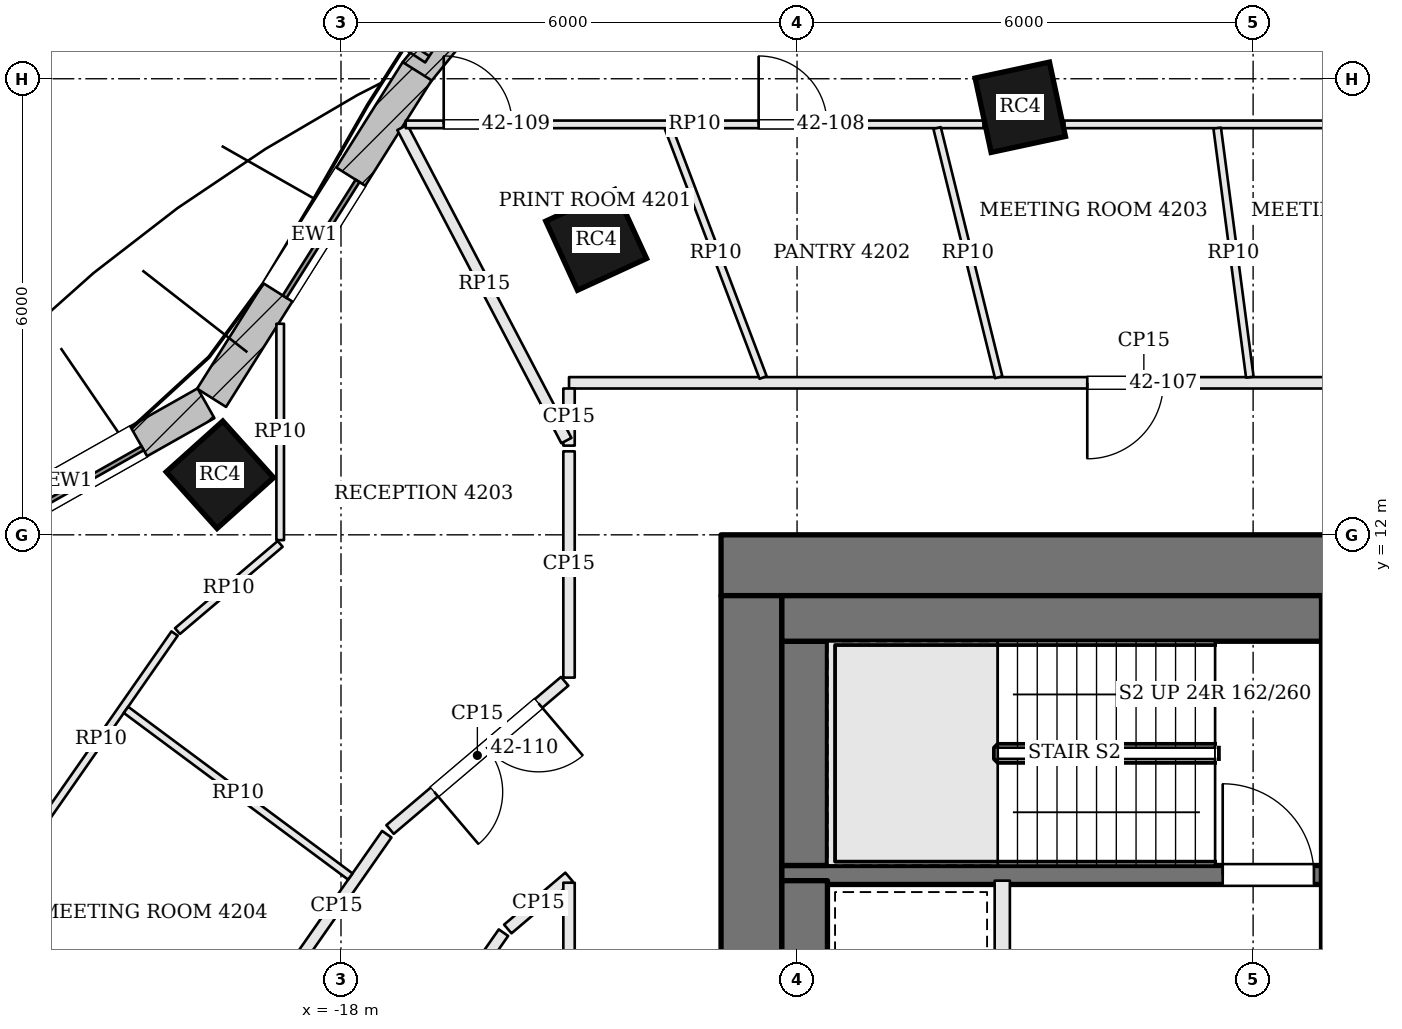
"""IFC4 building model, lengths in metres.
Left out: names, types, materials, properties, quantities, classifications, styles, units other than length and angle.
Written with IfcOpenShell. Run it as: python <this file> out.ifc"""

import sys

from ifc_helpers import new_model, si_unit, direction, frame, frame_2d, origin, origin_2d, place, context, subcontext, project, spatial, rectangle, extrude, element, fill, save


model = new_model("IFC4")
c1 = context("Model", 3, precision=1e-05, world=origin(), true_north=direction((0.0, 1.0)))
c2 = subcontext(c1, "Body", "Model", "MODEL_VIEW")
j1 = project(units=[si_unit("LENGTHUNIT", "METRE"), si_unit("PLANEANGLEUNIT", "RADIAN")], contexts=[c1])
p1 = place(None, origin())
s1 = spatial("IfcSite", under=j1, at=p1, CompositionType="ELEMENT")
p2 = place(p1, origin())
s2 = spatial("IfcBuilding", under=s1, at=p2, CompositionType="ELEMENT")
p3 = place(p2, frame((0.0, 0.0, 174.0)))
s3 = spatial("IfcBuildingStorey", under=s2, at=p3, CompositionType="ELEMENT", Elevation=174.0)
p4 = place(p3, frame((-13.0, 11.6, 0.0), z_axis=(0.0, 0.0, 1.0), x_axis=(1.0, 0.0, 0.0)))
e1 = element("IfcWall", 1, at=p4, inside=s3, PredefinedType="SHEAR", context=c2, shape_type="SweptSolid", body=[
    extrude(rectangle(XDim=26.0, YDim=0.8, at=frame_2d((13.0, 0.0))), origin(), (0.0, 0.0, 1.0), 3.9),
])
p5 = place(p4, frame((9.375, 0.0, 0.0)))
e2 = element("IfcOpeningElement", 2, at=p5, cuts=e1, PredefinedType="OPENING", context=c2, shape_type="SweptSolid", body=[
    extrude(rectangle(XDim=0.7, YDim=2.1, at=frame_2d((0.35, 1.05))), frame((0.0, 0.41, 0.0), z_axis=(0.0, -1.0, 0.0), x_axis=(1.0, 0.0, 0.0)), (0.0, 0.0, 1.0), 0.82),
])
p6 = place(p4, frame((12.075, 0.0, 0.0)))
e3 = element("IfcOpeningElement", 3, at=p6, cuts=e1, PredefinedType="OPENING", context=c2, shape_type="SweptSolid", body=[
    extrude(rectangle(XDim=1.0, YDim=2.1, at=frame_2d((0.5, 1.05))), frame((0.0, 0.41, 0.0), z_axis=(0.0, -1.0, 0.0), x_axis=(1.0, 0.0, 0.0)), (0.0, 0.0, 1.0), 0.82),
])
p7 = place(p4, frame((14.675, 0.0, 0.0)))
e4 = element("IfcOpeningElement", 4, at=p7, cuts=e1, PredefinedType="OPENING", context=c2, shape_type="SweptSolid", body=[
    extrude(rectangle(XDim=0.7, YDim=2.1, at=frame_2d((0.35, 1.05))), frame((0.0, 0.41, 0.0), z_axis=(0.0, -1.0, 0.0), x_axis=(1.0, 0.0, 0.0)), (0.0, 0.0, 1.0), 0.82),
])
p8 = place(p4, frame((16.625, 0.0, 0.0)))
e5 = element("IfcOpeningElement", 5, at=p8, cuts=e1, PredefinedType="OPENING", context=c2, shape_type="SweptSolid", body=[
    extrude(rectangle(XDim=0.9, YDim=2.1, at=frame_2d((0.45, 1.05))), frame((0.0, 0.41, 0.0), z_axis=(0.0, -1.0, 0.0), x_axis=(1.0, 0.0, 0.0)), (0.0, 0.0, 1.0), 0.82),
])
p9 = place(p3, frame((-12.6, -2.2, 0.0), z_axis=(0.0, 0.0, 1.0), x_axis=(0.0, 1.0, 0.0)))
e6 = element("IfcWall", 6, at=p9, inside=s3, PredefinedType="SHEAR", context=c2, shape_type="SweptSolid", body=[
    extrude(rectangle(XDim=13.4, YDim=0.8, at=frame_2d((6.7, 0.0))), origin(), (0.0, 0.0, 1.0), 3.9),
])
p10 = place(p9, frame((4.2, 0.0, 0.0)))
e7 = element("IfcOpeningElement", 7, at=p10, cuts=e6, PredefinedType="OPENING", context=c2, shape_type="SweptSolid", body=[
    extrude(rectangle(XDim=1.8, YDim=2.1, at=frame_2d((0.9, 1.05))), frame((0.0, 0.41, 0.0), z_axis=(0.0, -1.0, 0.0), x_axis=(1.0, 0.0, 0.0)), (0.0, 0.0, 1.0), 0.82),
])
for number, where, z_axis, x_axis in (
    (8, (-9.063, 17.625, -0.7), (0.0, 0.0, 1.0), (-0.978, -0.21, 0.0)),
    (9, (-14.643, 15.881, -0.7), (0.0, 0.0, 1.0), (-0.909, -0.417, 0.0)),
    (10, (-19.593, 12.79, -0.7), (0.0, 0.0, 1.0), (-0.744, -0.668, 0.0)),
):
    element("IfcColumn", number, at=place(p3, frame(where, z_axis=z_axis, x_axis=x_axis)), inside=s3, PredefinedType="COLUMN", context=c2, shape_type="SweptSolid", body=[
        extrude(rectangle(XDim=1.0, YDim=1.0, at=origin_2d()), origin(), (0.0, 0.0, 1.0), 4.6),
    ])
p11 = place(p3, frame((-14.926, 20.641, 0.0), z_axis=(0.0, 0.0, 1.0), x_axis=(-0.631548074669, -0.775336720001, 0.0)))
e11 = element("IfcWall", 11, at=p11, inside=s3, PredefinedType="SOLIDWALL", context=c2, shape_type="SweptSolid", body=[
    extrude(rectangle(XDim=3.308, YDim=0.45, at=frame_2d((1.654, 0.0))), origin(), (0.0, 0.0, 1.0), 3.7),
])
p12 = place(p11, frame((0.604, 0.0, 0.9)))
e12 = element("IfcOpeningElement", 12, at=p12, cuts=e11, PredefinedType="OPENING", context=c2, shape_type="SweptSolid", body=[
    extrude(rectangle(XDim=2.1, YDim=2.3, at=frame_2d((1.05, 1.15))), frame((0.0, 0.235, 0.0), z_axis=(0.0, -1.0, 0.0), x_axis=(1.0, 0.0, 0.0)), (0.0, 0.0, 1.0), 0.47),
])
p13 = place(p3, frame((-16.998, 18.099, 0.0), z_axis=(0.0, 0.0, 1.0), x_axis=(-0.532745661304, -0.846275404559, 0.0)))
e13 = element("IfcWall", 13, at=p13, inside=s3, PredefinedType="SOLIDWALL", context=c2, shape_type="SweptSolid", body=[
    extrude(rectangle(XDim=5.076, YDim=0.45, at=frame_2d((2.538, 0.0))), origin(), (0.0, 0.0, 1.0), 3.7),
])
p14 = place(p13, frame((1.638, 0.0, 0.9)))
e14 = element("IfcOpeningElement", 14, at=p14, cuts=e13, PredefinedType="OPENING", context=c2, shape_type="SweptSolid", body=[
    extrude(rectangle(XDim=1.8, YDim=2.3, at=frame_2d((0.9, 1.15))), frame((0.0, 0.235, 0.0), z_axis=(0.0, -1.0, 0.0), x_axis=(1.0, 0.0, 0.0)), (0.0, 0.0, 1.0), 0.47),
])
p15 = place(p3, frame((-19.776, 13.731, 0.0), z_axis=(0.0, 0.0, 1.0), x_axis=(-0.870610133829, -0.491973571318, 0.0)))
e15 = element("IfcWall", 15, at=p15, inside=s3, PredefinedType="SOLIDWALL", context=c2, shape_type="SweptSolid", body=[
    extrude(rectangle(XDim=4.134, YDim=0.45, at=frame_2d((2.067, 0.0))), origin(), (0.0, 0.0, 1.0), 3.7),
])
p16 = place(p15, frame((1.017, 0.0, 0.9)))
e16 = element("IfcOpeningElement", 16, at=p16, cuts=e15, PredefinedType="OPENING", context=c2, shape_type="SweptSolid", body=[
    extrude(rectangle(XDim=2.1, YDim=2.3, at=frame_2d((1.05, 1.15))), frame((0.0, 0.235, 0.0), z_axis=(0.0, -1.0, 0.0), x_axis=(1.0, 0.0, 0.0)), (0.0, 0.0, 1.0), 0.47),
])
p17 = place(p3, frame((-16.838, 18.298, 0.0), z_axis=(0.0, 0.0, 1.0), x_axis=(-0.835871900419, 0.548924554097, 0.0)))
e17 = element("IfcWall", 17, at=p17, inside=s3, PredefinedType="SOLIDWALL", context=c2, shape_type="SweptSolid", body=[
    extrude(rectangle(XDim=1.75, YDim=0.2, at=frame_2d((0.875, 0.0))), origin(), (0.0, 0.0, 1.0), 3.7),
])
p18 = place(p3, frame((-12.2, 7.525, 0.0), z_axis=(0.0, 0.0, 1.0), x_axis=(1.0, 0.0, 0.0)))
e18 = element("IfcWall", 18, at=p18, inside=s3, PredefinedType="SOLIDWALL", context=c2, shape_type="SweptSolid", body=[
    extrude(rectangle(XDim=7.1, YDim=0.25, at=frame_2d((3.55, 0.0))), origin(), (0.0, 0.0, 1.0), 3.7),
])
p19 = place(p18, frame((5.8, 0.0, 0.0)))
e19 = element("IfcOpeningElement", 19, at=p19, cuts=e18, PredefinedType="OPENING", context=c2, shape_type="SweptSolid", body=[
    extrude(rectangle(XDim=1.2, YDim=2.1, at=frame_2d((0.6, 1.05))), frame((0.0, 0.135, 0.0), z_axis=(0.0, -1.0, 0.0), x_axis=(1.0, 0.0, 0.0)), (0.0, 0.0, 1.0), 0.27),
])
p20 = place(p3, frame((-9.3, 4.45, 0.0), z_axis=(0.0, 0.0, 1.0), x_axis=(0.0, 1.0, 0.0)))
e20 = element("IfcWall", 20, at=p20, inside=s3, PredefinedType="SOLIDWALL", context=c2, shape_type="SweptSolid", body=[
    extrude(rectangle(XDim=3.0, YDim=0.2, at=frame_2d((1.5, 0.0))), origin(), (0.0, 0.0, 1.0), 3.7),
])
p21 = place(p3, frame((-4.975, -2.2, 0.0), z_axis=(0.0, 0.0, 1.0), x_axis=(0.0, 1.0, 0.0)))
e21 = element("IfcWall", 21, at=p21, inside=s3, PredefinedType="SOLIDWALL", context=c2, shape_type="SweptSolid", body=[
    extrude(rectangle(XDim=13.4, YDim=0.25, at=frame_2d((6.7, 0.0))), origin(), (0.0, 0.0, 1.0), 3.7),
])
p22 = place(p21, frame((5.25, 0.0, 0.0)))
e22 = element("IfcOpeningElement", 22, at=p22, cuts=e21, PredefinedType="OPENING", context=c2, shape_type="SweptSolid", body=[
    extrude(rectangle(XDim=1.2, YDim=2.1, at=frame_2d((0.6, 1.05))), frame((0.0, 0.135, 0.0), z_axis=(0.0, -1.0, 0.0), x_axis=(1.0, 0.0, 0.0)), (0.0, 0.0, 1.0), 0.27),
])
p23 = place(p3, frame((-11.9, 4.45, 0.0), z_axis=(0.0, 0.0, 1.0), x_axis=(0.0, 1.0, 0.0)))
e23 = element("IfcWall", 23, at=p23, inside=s3, PredefinedType="SOLIDWALL", context=c2, shape_type="SweptSolid", body=[
    extrude(rectangle(XDim=3.0, YDim=0.6, at=frame_2d((1.5, 0.0))), origin(), (0.0, 0.0, 1.0), 3.7),
])
p24 = place(p3, frame((-11.9, 7.65, 0.0), z_axis=(0.0, 0.0, 1.0), x_axis=(0.0, 1.0, 0.0)))
e24 = element("IfcWall", 24, at=p24, inside=s3, PredefinedType="SOLIDWALL", context=c2, shape_type="SweptSolid", body=[
    extrude(rectangle(XDim=2.95, YDim=0.6, at=frame_2d((1.475, 0.0))), origin(), (0.0, 0.0, 1.0), 3.7),
])
p25 = place(p3, frame((-12.2, 10.9, 0.0), z_axis=(0.0, 0.0, 1.0), x_axis=(1.0, 0.0, 0.0)))
e25 = element("IfcWall", 25, at=p25, inside=s3, PredefinedType="SOLIDWALL", context=c2, shape_type="SweptSolid", body=[
    extrude(rectangle(XDim=7.1, YDim=0.6, at=frame_2d((3.55, 0.0))), origin(), (0.0, 0.0, 1.0), 3.7),
])
p26 = place(p3, frame((0.125, 14.0, 0.0), z_axis=(0.0, 0.0, 1.0), x_axis=(-1.0, 0.0, 0.0)))
e26 = element("IfcWall", 26, at=p26, inside=s3, PredefinedType="PARTITIONING", context=c2, shape_type="SweptSolid", body=[
    extrude(rectangle(XDim=15.125, YDim=0.15, at=frame_2d((7.562, 0.0))), origin(), (0.0, 0.0, 1.0), 3.084),
])
p27 = place(p26, frame((0.888, 0.0, 0.0)))
e27 = element("IfcOpeningElement", 27, at=p27, cuts=e26, PredefinedType="OPENING", context=c2, shape_type="SweptSolid", body=[
    extrude(rectangle(XDim=1.0, YDim=2.1, at=frame_2d((0.5, 1.05))), frame((0.0, 0.085, 0.0), z_axis=(0.0, -1.0, 0.0), x_axis=(1.0, 0.0, 0.0)), (0.0, 0.0, 1.0), 0.17),
])
p28 = place(p26, frame((4.005, 0.0, 0.0)))
e28 = element("IfcOpeningElement", 28, at=p28, cuts=e26, PredefinedType="OPENING", context=c2, shape_type="SweptSolid", body=[
    extrude(rectangle(XDim=1.0, YDim=2.4, at=frame_2d((0.5, 1.2))), frame((0.0, 0.085, 0.0), z_axis=(0.0, -1.0, 0.0), x_axis=(1.0, 0.0, 0.0)), (0.0, 0.0, 1.0), 0.17),
])
p29 = place(p26, frame((7.307, 0.0, 0.0)))
e29 = element("IfcOpeningElement", 29, at=p29, cuts=e26, PredefinedType="OPENING", context=c2, shape_type="SweptSolid", body=[
    extrude(rectangle(XDim=1.0, YDim=2.4, at=frame_2d((0.5, 1.2))), frame((0.0, 0.085, 0.0), z_axis=(0.0, -1.0, 0.0), x_axis=(1.0, 0.0, 0.0)), (0.0, 0.0, 1.0), 0.17),
])
p30 = place(p3, frame((-15.0, 13.925, 0.0), z_axis=(0.0, 0.0, 1.0), x_axis=(0.0, -1.0, 0.0)))
e30 = element("IfcWall", 30, at=p30, inside=s3, PredefinedType="PARTITIONING", context=c2, shape_type="SweptSolid", body=[
    extrude(rectangle(XDim=0.751, YDim=0.15, at=frame_2d((0.376, 0.0))), origin(), (0.0, 0.0, 1.0), 3.084),
])
p31 = place(p3, frame((-17.193, 17.36, 0.0), z_axis=(0.0, 0.0, 1.0), x_axis=(0.463995225493, -0.885837699988, 0.0)))
e31 = element("IfcWall", 31, at=p31, inside=s3, PredefinedType="PARTITIONING", context=c2, shape_type="SweptSolid", body=[
    extrude(rectangle(XDim=4.651, YDim=0.15, at=frame_2d((2.325, 0.0))), origin(), (0.0, 0.0, 1.0), 3.234),
])
p32 = place(p3, frame((-15.0, 13.099, 0.0), z_axis=(0.0, 0.0, 1.0), x_axis=(0.0, -1.0, 0.0)))
e32 = element("IfcWall", 32, at=p32, inside=s3, PredefinedType="PARTITIONING", context=c2, shape_type="SweptSolid", body=[
    extrude(rectangle(XDim=2.977, YDim=0.15, at=frame_2d((1.489, 0.0))), origin(), (0.0, 0.0, 1.0), 3.084),
])
p33 = place(p3, frame((-15.057, 10.073, 0.0), z_axis=(0.0, 0.0, 1.0), x_axis=(-0.762398905861, -0.647107339119, 0.0)))
e33 = element("IfcWall", 33, at=p33, inside=s3, PredefinedType="PARTITIONING", context=c2, shape_type="SweptSolid", body=[
    extrude(rectangle(XDim=3.013, YDim=0.15, at=frame_2d((1.507, 0.0))), origin(), (0.0, 0.0, 1.0), 3.084),
])
p34 = place(p33, frame((0.45, 0.0, 0.0)))
e34 = element("IfcOpeningElement", 34, at=p34, cuts=e33, PredefinedType="OPENING", context=c2, shape_type="SweptSolid", body=[
    extrude(rectangle(XDim=1.8, YDim=2.1, at=frame_2d((0.9, 1.05))), frame((0.0, 0.085, 0.0), z_axis=(0.0, -1.0, 0.0), x_axis=(1.0, 0.0, 0.0)), (0.0, 0.0, 1.0), 0.17),
])
p35 = place(p3, frame((-17.397, 8.062, 0.0), z_axis=(0.0, 0.0, 1.0), x_axis=(-0.572118665737, -0.820170855563, 0.0)))
e35 = element("IfcWall", 35, at=p35, inside=s3, PredefinedType="PARTITIONING", context=c2, shape_type="SweptSolid", body=[
    extrude(rectangle(XDim=2.306, YDim=0.15, at=frame_2d((1.153, 0.0))), origin(), (0.0, 0.0, 1.0), 3.084),
])
p36 = place(p3, frame((-16.865, 5.329, 0.0), z_axis=(0.0, 0.0, 1.0), x_axis=(0.572096615639, 0.820186236397, 0.0)))
e36 = element("IfcWall", 36, at=p36, inside=s3, PredefinedType="PARTITIONING", context=c2, shape_type="SweptSolid", body=[
    extrude(rectangle(XDim=1.753, YDim=0.15, at=frame_2d((0.876, 0.0))), origin(), (0.0, 0.0, 1.0), 3.084),
])
p37 = place(p3, frame((-15.805, 6.814, 0.0), z_axis=(0.0, 0.0, 1.0), x_axis=(0.762298381233, 0.647225755027, 0.0)))
e37 = element("IfcWall", 37, at=p37, inside=s3, PredefinedType="PARTITIONING", context=c2, shape_type="SweptSolid", body=[
    extrude(rectangle(XDim=1.057, YDim=0.15, at=frame_2d((0.528, 0.0))), origin(), (0.0, 0.0, 1.0), 3.084),
])
p38 = place(p3, frame((-15.0, 7.423, 0.0), z_axis=(0.0, 0.0, 1.0), x_axis=(0.0, -1.0, 0.0)))
e38 = element("IfcWall", 38, at=p38, inside=s3, PredefinedType="PARTITIONING", context=c2, shape_type="SweptSolid", body=[
    extrude(rectangle(XDim=12.423, YDim=0.15, at=frame_2d((6.211, 0.0))), origin(), (0.0, 0.0, 1.0), 3.084),
])
p39 = place(p38, frame((5.174, 0.0, 0.0)))
e39 = element("IfcOpeningElement", 39, at=p39, cuts=e38, PredefinedType="OPENING", context=c2, shape_type="SweptSolid", body=[
    extrude(rectangle(XDim=1.0, YDim=2.1, at=frame_2d((0.5, 1.05))), frame((0.0, 0.085, 0.0), z_axis=(0.0, -1.0, 0.0), x_axis=(1.0, 0.0, 0.0)), (0.0, 0.0, 1.0), 0.17),
])
p40 = place(p3, frame((-17.149, 17.4, 0.0), z_axis=(0.0, 0.0, 1.0), x_axis=(1.0, 0.0, 0.0)))
e40 = element("IfcWall", 40, at=p40, inside=s3, PredefinedType="PARTITIONING", context=c2, shape_type="SweptSolid", body=[
    extrude(rectangle(XDim=7.602, YDim=0.1, at=frame_2d((3.801, 0.0))), origin(), (0.0, 0.0, 1.0), 3.084),
])
p41 = place(p40, frame((4.643, 0.0, 0.0)))
e41 = element("IfcOpeningElement", 41, at=p41, cuts=e40, PredefinedType="OPENING", context=c2, shape_type="SweptSolid", body=[
    extrude(rectangle(XDim=0.9, YDim=2.1, at=frame_2d((0.45, 1.05))), frame((0.0, 0.06, 0.0), z_axis=(0.0, -1.0, 0.0), x_axis=(1.0, 0.0, 0.0)), (0.0, 0.0, 1.0), 0.12),
])
p42 = place(p40, frame((0.5, 0.0, 0.0)))
e42 = element("IfcOpeningElement", 42, at=p42, cuts=e40, PredefinedType="OPENING", context=c2, shape_type="SweptSolid", body=[
    extrude(rectangle(XDim=0.9, YDim=2.1, at=frame_2d((0.45, 1.05))), frame((0.0, 0.06, 0.0), z_axis=(0.0, -1.0, 0.0), x_axis=(1.0, 0.0, 0.0)), (0.0, 0.0, 1.0), 0.12),
])
p43 = place(p3, frame((-8.483, 17.4, 0.0), z_axis=(0.0, 0.0, 1.0), x_axis=(1.0, 0.0, 0.0)))
e43 = element("IfcWall", 43, at=p43, inside=s3, PredefinedType="PARTITIONING", context=c2, shape_type="SweptSolid", body=[
    extrude(rectangle(XDim=8.671, YDim=0.1, at=frame_2d((4.335, 0.0))), origin(), (0.0, 0.0, 1.0), 3.084),
])
p44 = place(p43, frame((6.582, 0.0, 0.0)))
e44 = element("IfcOpeningElement", 44, at=p44, cuts=e43, PredefinedType="OPENING", context=c2, shape_type="SweptSolid", body=[
    extrude(rectangle(XDim=1.0, YDim=2.1, at=frame_2d((0.5, 1.05))), frame((0.0, 0.06, 0.0), z_axis=(0.0, -1.0, 0.0), x_axis=(1.0, 0.0, 0.0)), (0.0, 0.0, 1.0), 0.12),
])
p45 = place(p3, frame((-6.043, 14.074, 0.0), z_axis=(0.0, 0.0, 1.0), x_axis=(-0.12990779889, 0.991526078219, 0.0)))
e45 = element("IfcWall", 45, at=p45, inside=s3, PredefinedType="PARTITIONING", context=c2, shape_type="SweptSolid", body=[
    extrude(rectangle(XDim=3.304, YDim=0.1, at=frame_2d((1.652, 0.0))), origin(), (0.0, 0.0, 1.0), 3.084),
])
p46 = place(p3, frame((-9.347, 14.073, 0.0), z_axis=(0.0, 0.0, 1.0), x_axis=(-0.239847329474, 0.970810619299, 0.0)))
e46 = element("IfcWall", 46, at=p46, inside=s3, PredefinedType="PARTITIONING", context=c2, shape_type="SweptSolid", body=[
    extrude(rectangle(XDim=3.377, YDim=0.1, at=frame_2d((1.689, 0.0))), origin(), (0.0, 0.0, 1.0), 3.084),
])
p47 = place(p3, frame((-12.447, 14.07, 0.0), z_axis=(0.0, 0.0, 1.0), x_axis=(-0.354534757725, 0.935042836219, 0.0)))
e47 = element("IfcWall", 47, at=p47, inside=s3, PredefinedType="PARTITIONING", context=c2, shape_type="SweptSolid", body=[
    extrude(rectangle(XDim=3.511, YDim=0.1, at=frame_2d((1.756, 0.0))), origin(), (0.0, 0.0, 1.0), 3.084),
])
p48 = place(p3, frame((-22.125, 7.927, 0.0), z_axis=(0.0, 0.0, 1.0), x_axis=(0.572100301866, 0.820183665166, 0.0)))
e48 = element("IfcWall", 48, at=p48, inside=s3, PredefinedType="PARTITIONING", context=c2, shape_type="SweptSolid", body=[
    extrude(rectangle(XDim=3.382, YDim=0.1, at=frame_2d((1.691, 0.0))), origin(), (0.0, 0.0, 1.0), 3.084),
])
p49 = place(p3, frame((-20.151, 10.734, 0.0), z_axis=(0.0, 0.0, 1.0), x_axis=(0.762465888028, 0.647028414827, 0.0)))
e49 = element("IfcWall", 49, at=p49, inside=s3, PredefinedType="PARTITIONING", context=c2, shape_type="SweptSolid", body=[
    extrude(rectangle(XDim=1.772, YDim=0.1, at=frame_2d((0.886, 0.0))), origin(), (0.0, 0.0, 1.0), 3.084),
])
p50 = place(p3, frame((-18.8, 11.93, 0.0), z_axis=(0.0, 0.0, 1.0), x_axis=(0.0, 1.0, 0.0)))
e50 = element("IfcWall", 50, at=p50, inside=s3, PredefinedType="PARTITIONING", context=c2, shape_type="SweptSolid", body=[
    extrude(rectangle(XDim=2.846, YDim=0.1, at=frame_2d((1.423, 0.0))), origin(), (0.0, 0.0, 1.0), 3.084),
])
p51 = place(p3, frame((-17.877, 7.505, 0.0), z_axis=(0.0, 0.0, 1.0), x_axis=(-0.802692989486, 0.596392458563, 0.0)))
e51 = element("IfcWall", 51, at=p51, inside=s3, PredefinedType="PARTITIONING", context=c2, shape_type="SweptSolid", body=[
    extrude(rectangle(XDim=3.677, YDim=0.1, at=frame_2d((1.838, 0.0))), origin(), (0.0, 0.0, 1.0), 3.084),
])
p52 = place(p14, origin())
e52 = element("IfcWindow", 52, at=p52, inside=s3, PartitioningType="SINGLE_PANEL", PredefinedType="WINDOW", context=c2, shape_type="SweptSolid", body=[
    extrude(rectangle(XDim=1.8, YDim=2.3, at=frame_2d((0.9, 1.15))), frame((0.0, 0.135, 0.0), z_axis=(0.0, -1.0, 0.0), x_axis=(1.0, 0.0, 0.0)), (0.0, 0.0, 1.0), 0.06),
])
fill(e14, e52)
p53 = place(p16, origin())
e53 = element("IfcWindow", 53, at=p53, inside=s3, PartitioningType="SINGLE_PANEL", PredefinedType="WINDOW", context=c2, shape_type="SweptSolid", body=[
    extrude(rectangle(XDim=2.1, YDim=2.3, at=frame_2d((1.05, 1.15))), frame((0.0, 0.135, 0.0), z_axis=(0.0, -1.0, 0.0), x_axis=(1.0, 0.0, 0.0)), (0.0, 0.0, 1.0), 0.06),
])
fill(e16, e53)
p54 = place(p19, origin())
e54 = element("IfcDoor", 54, at=p54, inside=s3, OperationType="SINGLE_SWING_LEFT", PredefinedType="DOOR", context=c2, shape_type="SweptSolid", body=[
    extrude(rectangle(XDim=1.2, YDim=2.1, at=frame_2d((0.6, 1.05))), frame((0.0, 0.025, 0.0), z_axis=(0.0, -1.0, 0.0), x_axis=(1.0, 0.0, 0.0)), (0.0, 0.0, 1.0), 0.05),
])
fill(e19, e54)
p55 = place(p29, origin())
e55 = element("IfcDoor", 55, at=p55, inside=s3, OperationType="SINGLE_SWING_RIGHT", PredefinedType="DOOR", context=c2, shape_type="SweptSolid", body=[
    extrude(rectangle(XDim=1.0, YDim=2.4, at=frame_2d((0.5, 1.2))), frame((0.0, 0.025, 0.0), z_axis=(0.0, -1.0, 0.0), x_axis=(1.0, 0.0, 0.0)), (0.0, 0.0, 1.0), 0.05),
])
fill(e29, e55)
p56 = place(p41, origin())
e56 = element("IfcDoor", 56, at=p56, inside=s3, OperationType="SINGLE_SWING_LEFT", PredefinedType="DOOR", context=c2, shape_type="SweptSolid", body=[
    extrude(rectangle(XDim=0.9, YDim=2.1, at=frame_2d((0.45, 1.05))), frame((0.0, 0.025, 0.0), z_axis=(0.0, -1.0, 0.0), x_axis=(1.0, 0.0, 0.0)), (0.0, 0.0, 1.0), 0.05),
])
fill(e41, e56)
p57 = place(p42, origin())
e57 = element("IfcDoor", 57, at=p57, inside=s3, OperationType="SINGLE_SWING_LEFT", PredefinedType="DOOR", context=c2, shape_type="SweptSolid", body=[
    extrude(rectangle(XDim=0.9, YDim=2.1, at=frame_2d((0.45, 1.05))), frame((0.0, 0.025, 0.0), z_axis=(0.0, -1.0, 0.0), x_axis=(1.0, 0.0, 0.0)), (0.0, 0.0, 1.0), 0.05),
])
fill(e42, e57)
p58 = place(p34, origin())
e58 = element("IfcDoor", 58, at=p58, inside=s3, OperationType="DOUBLE_DOOR_SINGLE_SWING", PredefinedType="DOOR", context=c2, shape_type="SweptSolid", body=[
    extrude(rectangle(XDim=1.8, YDim=2.1, at=frame_2d((0.9, 1.05))), frame((0.0, 0.025, 0.0), z_axis=(0.0, -1.0, 0.0), x_axis=(1.0, 0.0, 0.0)), (0.0, 0.0, 1.0), 0.05),
])
fill(e34, e58)
save(model, sys.argv[1])
